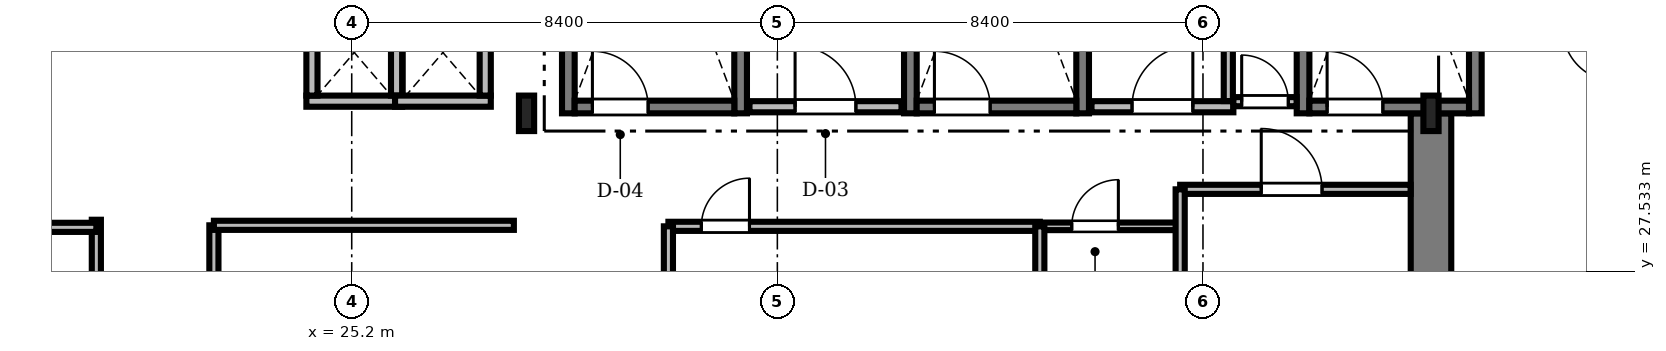
"""IFC4 building model, lengths in metres.
Left out: names, types, materials, properties, quantities, classifications, styles, units other than length and angle.
Written with IfcOpenShell. Run it as: python <this file> out.ifc"""

import sys

from ifc_helpers import new_model, si_unit, direction, frame, frame_2d, origin, origin_2d, place, context, subcontext, project, spatial, rectangle, i_section, extrude, source, transform, mapped, element, fill, save


model = new_model("IFC4")
c1 = context("Model", 3, precision=1e-05, world=origin(), true_north=direction((0.0, 1.0)))
c2 = subcontext(c1, "Body", "Model", "MODEL_VIEW")
j1 = project(units=[si_unit("LENGTHUNIT", "METRE"), si_unit("PLANEANGLEUNIT", "RADIAN")], contexts=[c1])
p1 = place(None, origin())
s1 = spatial("IfcSite", under=j1, at=p1, CompositionType="ELEMENT")
p2 = place(p1, origin())
s2 = spatial("IfcBuilding", under=s1, at=p2, CompositionType="ELEMENT")
p3 = place(p2, frame((0.0, 0.0, 177.2)))
s3 = spatial("IfcBuildingStorey", under=s2, at=p3, CompositionType="ELEMENT", Elevation=177.2)
m1 = source(origin(), c2, "Body", "SweptSolid", [
    extrude(rectangle(XDim=13.15, YDim=0.8, at=frame_2d((6.575, 0.0))), origin(), (0.0, 0.0, 1.0), 3.58),
])
p4 = place(p3, frame((46.5, 17.5, 0.0), z_axis=(0.0, 0.0, 1.0), x_axis=(0.0, 1.0, 0.0)))
e1 = element("IfcWall", 1, at=p4, inside=s3, PredefinedType="SHEAR", context=c2, shape_type="MappedRepresentation", body=[
    mapped(m1, transform((0.0, 0.0, 0.0), scale=1.0)),
])
m2 = source(origin(), c2, "Body", "SweptSolid", [
    extrude(i_section(OverallWidth=0.3, OverallDepth=0.7, WebThickness=0.017, FlangeThickness=0.032, FilletRadius=0.027, at=origin_2d()), origin(), (0.0, 0.0, 1.0), 3.58),
])
for number, where, z_axis, x_axis in (
    (2, (28.65, 30.65, 0.0), (0.0, 0.0, 1.0), (1.0, 0.0, 0.0)),
    (3, (46.5, 30.65, 0.0), (0.0, 0.0, 1.0), (1.0, 0.0, 0.0)),
):
    element("IfcColumn", number, at=place(p3, frame(where, z_axis=z_axis, x_axis=x_axis)), inside=s3, PredefinedType="COLUMN", context=c2, shape_type="MappedRepresentation", body=[
        mapped(m2, transform((0.0, 0.0, 0.0), scale=1.0)),
    ])
m3 = source(origin(), c2, "Body", "SweptSolid", [
    extrude(rectangle(XDim=9.25, YDim=0.25, at=frame_2d((4.625, 0.0))), origin(), (0.0, 0.0, 1.0), 3.6),
])
for number, where, z_axis, x_axis in (
    (4, (29.475, 30.65, 0.0), (0.0, 0.0, 1.0), (0.0, 1.0, 0.0)),
    (5, (32.875, 30.65, 0.0), (0.0, 0.0, 1.0), (0.0, 1.0, 0.0)),
):
    element("IfcWall", number, at=place(p3, frame(where, z_axis=z_axis, x_axis=x_axis)), inside=s3, PredefinedType="SOLIDWALL", context=c2, shape_type="MappedRepresentation", body=[
        mapped(m3, transform((0.0, 0.0, 0.0), scale=1.0)),
    ])
m4 = source(origin(), c2, "Body", "SweptSolid", [
    extrude(rectangle(XDim=3.15, YDim=0.25, at=frame_2d((1.575, 0.0))), origin(), (0.0, 0.0, 1.0), 3.6),
])
p5 = place(p3, frame((29.6, 30.775, 0.0), z_axis=(0.0, 0.0, 1.0), x_axis=(1.0, 0.0, 0.0)))
e6 = element("IfcWall", 6, at=p5, inside=s3, PredefinedType="SOLIDWALL", context=c2, shape_type="MappedRepresentation", body=[
    mapped(m4, transform((0.0, 0.0, 0.0), scale=1.0)),
])
m5 = source(origin(), c2, "Body", "SweptSolid", [
    extrude(rectangle(XDim=1.1, YDim=2.2, at=frame_2d((0.55, 1.1))), frame((0.0, 0.135, 0.0), z_axis=(0.0, -1.0, 0.0), x_axis=(1.0, 0.0, 0.0)), (0.0, 0.0, 1.0), 0.27),
])
p6 = place(p5, frame((0.35, 0.0, 0.0)))
e7 = element("IfcOpeningElement", 7, at=p6, cuts=e6, PredefinedType="OPENING", context=c2, shape_type="MappedRepresentation", body=[
    mapped(m5, transform((0.0, 0.0, 0.0), scale=1.0)),
])
for number, where, z_axis, x_axis in (
    (8, (36.225, 30.65, 0.0), (0.0, 0.0, 1.0), (0.0, 1.0, 0.0)),
    (9, (39.625, 30.65, 0.0), (0.0, 0.0, 1.0), (0.0, 1.0, 0.0)),
):
    element("IfcWall", number, at=place(p3, frame(where, z_axis=z_axis, x_axis=x_axis)), inside=s3, PredefinedType="SOLIDWALL", context=c2, shape_type="MappedRepresentation", body=[
        mapped(m3, transform((0.0, 0.0, 0.0), scale=1.0)),
    ])
p7 = place(p3, frame((36.35, 30.775, 0.0), z_axis=(0.0, 0.0, 1.0), x_axis=(1.0, 0.0, 0.0)))
e10 = element("IfcWall", 10, at=p7, inside=s3, PredefinedType="SOLIDWALL", context=c2, shape_type="MappedRepresentation", body=[
    mapped(m4, transform((0.0, 0.0, 0.0), scale=1.0)),
])
p8 = place(p7, frame((0.35, 0.0, 0.0)))
e11 = element("IfcOpeningElement", 11, at=p8, cuts=e10, PredefinedType="OPENING", context=c2, shape_type="MappedRepresentation", body=[
    mapped(m5, transform((0.0, 0.0, 0.0), scale=1.0)),
])
for number, where, z_axis, x_axis in (
    (12, (43.975, 30.65, 0.0), (0.0, 0.0, 1.0), (0.0, 1.0, 0.0)),
    (13, (47.375, 30.65, 0.0), (0.0, 0.0, 1.0), (0.0, 1.0, 0.0)),
):
    element("IfcWall", number, at=place(p3, frame(where, z_axis=z_axis, x_axis=x_axis)), inside=s3, PredefinedType="SOLIDWALL", context=c2, shape_type="MappedRepresentation", body=[
        mapped(m3, transform((0.0, 0.0, 0.0), scale=1.0)),
    ])
p9 = place(p3, frame((44.1, 30.775, 0.0), z_axis=(0.0, 0.0, 1.0), x_axis=(1.0, 0.0, 0.0)))
e14 = element("IfcWall", 14, at=p9, inside=s3, PredefinedType="SOLIDWALL", context=c2, shape_type="MappedRepresentation", body=[
    mapped(m4, transform((0.0, 0.0, 0.0), scale=1.0)),
])
p10 = place(p9, frame((0.35, 0.0, 0.0)))
e15 = element("IfcOpeningElement", 15, at=p10, cuts=e14, PredefinedType="OPENING", context=c2, shape_type="MappedRepresentation", body=[
    mapped(m5, transform((0.0, 0.0, 0.0), scale=1.0)),
])
m6 = source(origin(), c2, "Body", "SweptSolid", [
    extrude(rectangle(XDim=3.0, YDim=0.22, at=frame_2d((1.5, 0.0))), origin(), (0.0, 0.0, 1.0), 3.58),
])
p11 = place(p3, frame((33.05, 30.78, 0.0), z_axis=(0.0, 0.0, 1.0), x_axis=(1.0, 0.0, 0.0)))
e16 = element("IfcWall", 16, at=p11, inside=s3, PredefinedType="SOLIDWALL", context=c2, shape_type="MappedRepresentation", body=[
    mapped(m6, transform((0.0, 0.0, 0.0), scale=1.0)),
])
m7 = source(origin(), c2, "Body", "SweptSolid", [
    extrude(rectangle(XDim=1.2, YDim=2.2, at=frame_2d((0.6, 1.1))), frame((0.0, 0.12, 0.0), z_axis=(0.0, -1.0, 0.0), x_axis=(1.0, 0.0, 0.0)), (0.0, 0.0, 1.0), 0.24),
])
p12 = place(p11, frame((0.9, 0.0, 0.0)))
e17 = element("IfcOpeningElement", 17, at=p12, cuts=e16, PredefinedType="OPENING", context=c2, shape_type="MappedRepresentation", body=[
    mapped(m7, transform((0.0, 0.0, 0.0), scale=1.0)),
])
m8 = source(origin(), c2, "Body", "SweptSolid", [
    extrude(rectangle(XDim=2.8, YDim=0.22, at=frame_2d((1.4, 0.0))), origin(), (0.0, 0.0, 1.0), 3.58),
])
p13 = place(p3, frame((39.8, 30.78, 0.0), z_axis=(0.0, 0.0, 1.0), x_axis=(1.0, 0.0, 0.0)))
e18 = element("IfcWall", 18, at=p13, inside=s3, PredefinedType="SOLIDWALL", context=c2, shape_type="MappedRepresentation", body=[
    mapped(m8, transform((0.0, 0.0, 0.0), scale=1.0)),
])
p14 = place(p13, frame((0.8, 0.0, 0.0)))
e19 = element("IfcOpeningElement", 19, at=p14, cuts=e18, PredefinedType="OPENING", context=c2, shape_type="MappedRepresentation", body=[
    mapped(m7, transform((0.0, 0.0, 0.0), scale=1.0)),
])
m9 = source(origin(), c2, "Body", "SweptSolid", [
    extrude(rectangle(XDim=1.89, YDim=0.22, at=frame_2d((0.945, 0.0))), origin(), (0.0, 0.0, 1.0), 3.58),
])
p15 = place(p3, frame((24.305, 30.89, 0.0), z_axis=(0.0, 0.0, 1.0), x_axis=(1.0, 0.0, 0.0)))
e20 = element("IfcWall", 20, at=p15, inside=s3, PredefinedType="SOLIDWALL", context=c2, shape_type="MappedRepresentation", body=[
    mapped(m9, transform((0.0, 0.0, 0.0), scale=1.0)),
])
m10 = source(origin(), c2, "Body", "SweptSolid", [
    extrude(rectangle(XDim=1.7, YDim=0.22, at=frame_2d((0.85, 0.0))), origin(), (0.0, 0.0, 1.0), 3.022),
])
for number, where, z_axis, x_axis in (
    (21, (24.415, 31.0, 0.0), (0.0, 0.0, 1.0), (0.0, 1.0, 0.0)),
    (22, (26.085, 31.0, 0.0), (0.0, 0.0, 1.0), (0.0, 1.0, 0.0)),
):
    element("IfcWall", number, at=place(p3, frame(where, z_axis=z_axis, x_axis=x_axis)), inside=s3, PredefinedType="SOLIDWALL", context=c2, shape_type="MappedRepresentation", body=[
        mapped(m10, transform((0.0, 0.0, 0.0), scale=1.0)),
    ])
m11 = source(origin(), c2, "Body", "SweptSolid", [
    extrude(rectangle(XDim=1.89, YDim=0.22, at=frame_2d((0.945, 0.0))), origin(), (0.0, 0.0, 1.0), 3.022),
])
p16 = place(p3, frame((26.055, 30.89, 0.0), z_axis=(0.0, 0.0, 1.0), x_axis=(1.0, 0.0, 0.0)))
e23 = element("IfcWall", 23, at=p16, inside=s3, PredefinedType="SOLIDWALL", context=c2, shape_type="MappedRepresentation", body=[
    mapped(m11, transform((0.0, 0.0, 0.0), scale=1.0)),
])
p17 = place(p3, frame((27.835, 31.0, 0.0), z_axis=(0.0, 0.0, 1.0), x_axis=(0.0, 1.0, 0.0)))
e24 = element("IfcWall", 24, at=p17, inside=s3, PredefinedType="SOLIDWALL", context=c2, shape_type="MappedRepresentation", body=[
    mapped(m10, transform((0.0, 0.0, 0.0), scale=1.0)),
])
m12 = source(origin(), c2, "Body", "SweptSolid", [
    extrude(rectangle(XDim=15.04, YDim=0.18, at=frame_2d((7.52, 0.0))), origin(), (0.0, 0.0, 1.0), 3.022),
])
p18 = place(p3, frame((20.16, 13.51, 0.0), z_axis=(0.0, 0.0, 1.0), x_axis=(0.0, 1.0, 0.0)))
e25 = element("IfcWall", 25, at=p18, inside=s3, PredefinedType="PARTITIONING", context=c2, shape_type="MappedRepresentation", body=[
    mapped(m12, transform((0.0, 0.0, 0.0), scale=1.0)),
])
m13 = source(origin(), c2, "Body", "SweptSolid", [
    extrude(rectangle(XDim=1.05, YDim=2.2, at=frame_2d((0.525, 1.1))), frame((0.0, 0.1, 0.0), z_axis=(0.0, -1.0, 0.0), x_axis=(1.0, 0.0, 0.0)), (0.0, 0.0, 1.0), 0.2),
])
p19 = place(p18, frame((3.202, 0.0, 0.0)))
e26 = element("IfcOpeningElement", 26, at=p19, cuts=e25, PredefinedType="OPENING", context=c2, shape_type="MappedRepresentation", body=[
    mapped(m13, transform((0.0, 0.0, 0.0), scale=1.0)),
])
m14 = source(origin(), c2, "Body", "SweptSolid", [
    extrude(rectangle(XDim=0.95, YDim=2.15, at=frame_2d((0.475, 1.075))), frame((0.0, 0.1, 0.0), z_axis=(0.0, -1.0, 0.0), x_axis=(1.0, 0.0, 0.0)), (0.0, 0.0, 1.0), 0.2),
])
p20 = place(p18, frame((11.873, 0.0, 0.0)))
e27 = element("IfcOpeningElement", 27, at=p20, cuts=e25, PredefinedType="OPENING", context=c2, shape_type="MappedRepresentation", body=[
    mapped(m14, transform((0.0, 0.0, 0.0), scale=1.0)),
])
m15 = source(origin(), c2, "Body", "SweptSolid", [
    extrude(rectangle(XDim=11.94, YDim=0.18, at=frame_2d((5.97, 0.0))), origin(), (0.0, 0.0, 1.0), 3.022),
])
p21 = place(p3, frame((22.48, 16.5, 0.0), z_axis=(0.0, 0.0, 1.0), x_axis=(0.0, 1.0, 0.0)))
e28 = element("IfcWall", 28, at=p21, inside=s3, PredefinedType="PARTITIONING", context=c2, shape_type="MappedRepresentation", body=[
    mapped(m15, transform((0.0, 0.0, 0.0), scale=1.0)),
])
p22 = place(p21, frame((4.5, 0.0, 0.0)))
e29 = element("IfcOpeningElement", 29, at=p22, cuts=e28, PredefinedType="OPENING", context=c2, shape_type="MappedRepresentation", body=[
    mapped(m13, transform((0.0, 0.0, 0.0), scale=1.0)),
])
m16 = source(origin(), c2, "Body", "SweptSolid", [
    extrude(rectangle(XDim=7.33, YDim=0.18, at=frame_2d((3.665, 0.0))), origin(), (0.0, 0.0, 1.0), 3.212),
])
p23 = place(p3, frame((31.45, 28.42, 0.0), z_axis=(0.0, 0.0, 1.0), x_axis=(1.0, 0.0, 0.0)))
e30 = element("IfcWall", 30, at=p23, inside=s3, PredefinedType="PARTITIONING", context=c2, shape_type="MappedRepresentation", body=[
    mapped(m16, transform((0.0, 0.0, 0.0), scale=1.0)),
])
p24 = place(p23, frame((0.65, 0.0, 0.0)))
e31 = element("IfcOpeningElement", 31, at=p24, cuts=e30, PredefinedType="OPENING", context=c2, shape_type="MappedRepresentation", body=[
    mapped(m14, transform((0.0, 0.0, 0.0), scale=1.0)),
])
m17 = source(origin(), c2, "Body", "SweptSolid", [
    extrude(rectangle(XDim=4.548, YDim=0.18, at=frame_2d((2.274, 0.0))), origin(), (0.0, 0.0, 1.0), 3.212),
])
p25 = place(p3, frame((41.55, 29.15, 0.0), z_axis=(0.0, 0.0, 1.0), x_axis=(1.0, 0.0, 0.0)))
e32 = element("IfcWall", 32, at=p25, inside=s3, PredefinedType="PARTITIONING", context=c2, shape_type="MappedRepresentation", body=[
    mapped(m17, transform((0.0, 0.0, 0.0), scale=1.0)),
])
m18 = source(origin(), c2, "Body", "SweptSolid", [
    extrude(rectangle(XDim=1.2, YDim=2.2, at=frame_2d((0.6, 1.1))), frame((0.0, 0.1, 0.0), z_axis=(0.0, -1.0, 0.0), x_axis=(1.0, 0.0, 0.0)), (0.0, 0.0, 1.0), 0.2),
])
p26 = place(p25, frame((1.6, 0.0, 0.0)))
e33 = element("IfcOpeningElement", 33, at=p26, cuts=e32, PredefinedType="OPENING", context=c2, shape_type="MappedRepresentation", body=[
    mapped(m18, transform((0.0, 0.0, 0.0), scale=1.0)),
])
m19 = source(origin(), c2, "Body", "SweptSolid", [
    extrude(rectangle(XDim=2.74, YDim=0.15, at=frame_2d((1.37, 0.0))), origin(), (0.0, 0.0, 1.0), 3.58),
])
p27 = place(p3, frame((38.78, 28.42, 0.0), z_axis=(0.0, 0.0, 1.0), x_axis=(1.0, 0.0, 0.0)))
e34 = element("IfcWall", 34, at=p27, inside=s3, PredefinedType="PARTITIONING", context=c2, shape_type="MappedRepresentation", body=[
    mapped(m19, transform((0.0, 0.0, 0.0), scale=1.0)),
])
m20 = source(origin(), c2, "Body", "SweptSolid", [
    extrude(rectangle(XDim=0.92, YDim=2.1, at=frame_2d((0.46, 1.05))), frame((0.0, 0.085, 0.0), z_axis=(0.0, -1.0, 0.0), x_axis=(1.0, 0.0, 0.0)), (0.0, 0.0, 1.0), 0.17),
])
p28 = place(p27, frame((0.63, 0.0, 0.0)))
e35 = element("IfcOpeningElement", 35, at=p28, cuts=e34, PredefinedType="OPENING", context=c2, shape_type="MappedRepresentation", body=[
    mapped(m20, transform((0.0, 0.0, 0.0), scale=1.0)),
])
m21 = source(origin(), c2, "Body", "SweptSolid", [
    extrude(rectangle(XDim=1.248, YDim=0.18, at=frame_2d((0.624, 0.0))), origin(), (0.0, 0.0, 1.0), 3.58),
])
p29 = place(p3, frame((42.6, 30.88, 0.0), z_axis=(0.0, 0.0, 1.0), x_axis=(1.0, 0.0, 0.0)))
e36 = element("IfcWall", 36, at=p29, inside=s3, PredefinedType="PARTITIONING", context=c2, shape_type="MappedRepresentation", body=[
    mapped(m21, transform((0.0, 0.0, 0.0), scale=1.0)),
])
m22 = source(origin(), c2, "Body", "SweptSolid", [
    extrude(rectangle(XDim=0.92, YDim=2.1, at=frame_2d((0.46, 1.05))), frame((0.0, 0.1, 0.0), z_axis=(0.0, -1.0, 0.0), x_axis=(1.0, 0.0, 0.0)), (0.0, 0.0, 1.0), 0.2),
])
p30 = place(p29, frame((0.164, 0.0, 0.0)))
e37 = element("IfcOpeningElement", 37, at=p30, cuts=e36, PredefinedType="OPENING", context=c2, shape_type="MappedRepresentation", body=[
    mapped(m22, transform((0.0, 0.0, 0.0), scale=1.0)),
])
m23 = source(origin(), c2, "Body", "SweptSolid", [
    extrude(rectangle(XDim=8.93, YDim=0.18, at=frame_2d((4.465, 0.0))), origin(), (0.0, 0.0, 1.0), 2.822),
])
p31 = place(p3, frame((11.23, 28.4, 0.0), z_axis=(0.0, 0.0, 1.0), x_axis=(1.0, 0.0, 0.0)))
e38 = element("IfcWall", 38, at=p31, inside=s3, PredefinedType="PARTITIONING", context=c2, shape_type="MappedRepresentation", body=[
    mapped(m23, transform((0.0, 0.0, 0.0), scale=1.0)),
])
m24 = source(origin(), c2, "Body", "SweptSolid", [
    extrude(rectangle(XDim=5.92, YDim=0.18, at=frame_2d((2.96, 0.0))), origin(), (0.0, 0.0, 1.0), 3.58),
])
p32 = place(p3, frame((22.48, 28.44, 0.0), z_axis=(0.0, 0.0, 1.0), x_axis=(1.0, 0.0, 0.0)))
e39 = element("IfcWall", 39, at=p32, inside=s3, PredefinedType="PARTITIONING", context=c2, shape_type="MappedRepresentation", body=[
    mapped(m24, transform((0.0, 0.0, 0.0), scale=1.0)),
])
m25 = source(origin(), c2, "Body", "SweptSolid", [
    extrude(rectangle(XDim=2.758, YDim=0.18, at=frame_2d((1.379, 0.0))), origin(), (0.0, 0.0, 1.0), 3.58),
])
p33 = place(p3, frame((42.5, 30.892, 0.0), z_axis=(0.0, 0.0, 1.0), x_axis=(0.0, 1.0, 0.0)))
e40 = element("IfcWall", 40, at=p33, inside=s3, PredefinedType="PARTITIONING", context=c2, shape_type="MappedRepresentation", body=[
    mapped(m25, transform((0.0, 0.0, 0.0), scale=1.0)),
])
m26 = source(origin(), c2, "Body", "SweptSolid", [
    extrude(rectangle(XDim=2.35, YDim=0.18, at=frame_2d((1.175, 0.0))), origin(), (0.0, 0.0, 1.0), 3.022),
])
p34 = place(p3, frame((41.55, 26.8, 0.0), z_axis=(0.0, 0.0, 1.0), x_axis=(0.0, 1.0, 0.0)))
e41 = element("IfcWall", 41, at=p34, inside=s3, PredefinedType="PARTITIONING", context=c2, shape_type="MappedRepresentation", body=[
    mapped(m26, transform((0.0, 0.0, 0.0), scale=1.0)),
])
m27 = source(origin(), c2, "Body", "SweptSolid", [
    extrude(rectangle(XDim=1.6, YDim=0.18, at=frame_2d((0.8, 0.0))), origin(), (0.0, 0.0, 1.0), 3.122),
])
for number, where, z_axis, x_axis in (
    (42, (31.45, 26.82, 0.0), (0.0, 0.0, 1.0), (0.0, 1.0, 0.0)),
    (43, (38.78, 26.82, 0.0), (0.0, 0.0, 1.0), (0.0, 1.0, 0.0)),
):
    element("IfcWall", number, at=place(p3, frame(where, z_axis=z_axis, x_axis=x_axis)), inside=s3, PredefinedType="PARTITIONING", context=c2, shape_type="MappedRepresentation", body=[
        mapped(m27, transform((0.0, 0.0, 0.0), scale=1.0)),
    ])
m28 = source(origin(), c2, "Body", "SweptSolid", [
    extrude(rectangle(XDim=1.1, YDim=2.2, at=frame_2d((0.55, 1.1))), frame((0.0, 0.025, 0.0), z_axis=(0.0, -1.0, 0.0), x_axis=(1.0, 0.0, 0.0)), (0.0, 0.0, 1.0), 0.05),
])
p35 = place(p6, origin())
e44 = element("IfcDoor", 44, at=p35, inside=s3, OperationType="SINGLE_SWING_LEFT", PredefinedType="DOOR", context=c2, shape_type="MappedRepresentation", body=[
    mapped(m28, transform((0.0, 0.0, 0.0), scale=1.0)),
])
fill(e7, e44)
p36 = place(p8, origin())
e45 = element("IfcDoor", 45, at=p36, inside=s3, OperationType="SINGLE_SWING_LEFT", PredefinedType="DOOR", context=c2, shape_type="MappedRepresentation", body=[
    mapped(m28, transform((0.0, 0.0, 0.0), scale=1.0)),
])
fill(e11, e45)
p37 = place(p10, origin())
e46 = element("IfcDoor", 46, at=p37, inside=s3, OperationType="SINGLE_SWING_LEFT", PredefinedType="DOOR", context=c2, shape_type="MappedRepresentation", body=[
    mapped(m28, transform((0.0, 0.0, 0.0), scale=1.0)),
])
fill(e15, e46)
m29 = source(origin(), c2, "Body", "SweptSolid", [
    extrude(rectangle(XDim=1.2, YDim=2.2, at=frame_2d((0.6, 1.1))), frame((0.0, 0.025, 0.0), z_axis=(0.0, -1.0, 0.0), x_axis=(1.0, 0.0, 0.0)), (0.0, 0.0, 1.0), 0.05),
])
p38 = place(p12, origin())
e47 = element("IfcDoor", 47, at=p38, inside=s3, OperationType="SINGLE_SWING_LEFT", PredefinedType="DOOR", context=c2, shape_type="MappedRepresentation", body=[
    mapped(m29, transform((0.0, 0.0, 0.0), scale=1.0)),
])
fill(e17, e47)
p39 = place(p14, origin())
e48 = element("IfcDoor", 48, at=p39, inside=s3, OperationType="SINGLE_SWING_RIGHT", PredefinedType="DOOR", context=c2, shape_type="MappedRepresentation", body=[
    mapped(m29, transform((0.0, 0.0, 0.0), scale=1.0)),
])
fill(e19, e48)
m30 = source(origin(), c2, "Body", "SweptSolid", [
    extrude(rectangle(XDim=0.95, YDim=2.15, at=frame_2d((0.475, 1.075))), frame((0.0, 0.025, 0.0), z_axis=(0.0, -1.0, 0.0), x_axis=(1.0, 0.0, 0.0)), (0.0, 0.0, 1.0), 0.05),
])
p40 = place(p24, origin())
e49 = element("IfcDoor", 49, at=p40, inside=s3, OperationType="SINGLE_SWING_RIGHT", PredefinedType="DOOR", context=c2, shape_type="MappedRepresentation", body=[
    mapped(m30, transform((0.0, 0.0, 0.0), scale=1.0)),
])
fill(e31, e49)
p41 = place(p26, origin())
e50 = element("IfcDoor", 50, at=p41, inside=s3, OperationType="SINGLE_SWING_LEFT", PredefinedType="DOOR", context=c2, shape_type="MappedRepresentation", body=[
    mapped(m29, transform((0.0, 0.0, 0.0), scale=1.0)),
])
fill(e33, e50)
m31 = source(origin(), c2, "Body", "SweptSolid", [
    extrude(rectangle(XDim=0.92, YDim=2.1, at=frame_2d((0.46, 1.05))), frame((0.0, 0.025, 0.0), z_axis=(0.0, -1.0, 0.0), x_axis=(1.0, 0.0, 0.0)), (0.0, 0.0, 1.0), 0.05),
])
p42 = place(p28, origin())
e51 = element("IfcDoor", 51, at=p42, inside=s3, OperationType="SINGLE_SWING_RIGHT", PredefinedType="DOOR", context=c2, shape_type="MappedRepresentation", body=[
    mapped(m31, transform((0.0, 0.0, 0.0), scale=1.0)),
])
fill(e35, e51)
p43 = place(p30, origin())
e52 = element("IfcDoor", 52, at=p43, inside=s3, OperationType="SINGLE_SWING_LEFT", PredefinedType="DOOR", context=c2, shape_type="MappedRepresentation", body=[
    mapped(m31, transform((0.0, 0.0, 0.0), scale=1.0)),
])
fill(e37, e52)
save(model, sys.argv[1])
